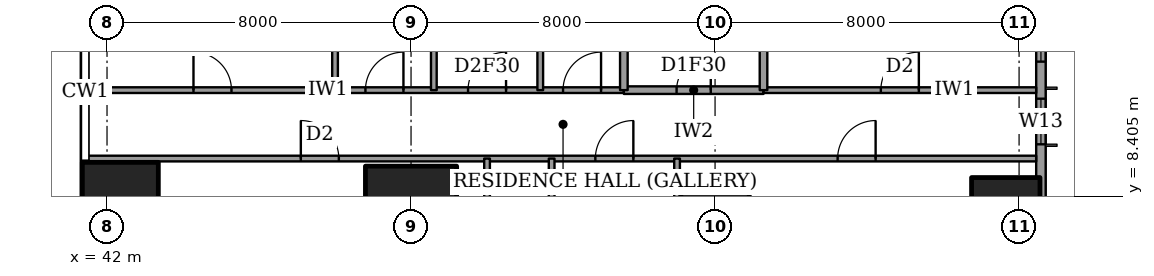
"""IFC4 building model, lengths in metres.
Left out: names, types, materials, properties, quantities, classifications, styles, units other than length and angle.
Written with IfcOpenShell. Run it as: python <this file> out.ifc"""

import sys

from ifc_helpers import new_model, si_unit, direction, frame, frame_2d, origin, origin_2d, place, context, subcontext, project, spatial, rectangle, extrude, element, fill, save


model = new_model("IFC4")
c1 = context("Model", 3, precision=1e-05, world=origin(), true_north=direction((0.0, 1.0)))
c2 = subcontext(c1, "Body", "Model", "MODEL_VIEW")
j1 = project(units=[si_unit("LENGTHUNIT", "METRE"), si_unit("PLANEANGLEUNIT", "RADIAN")], contexts=[c1])
p1 = place(None, origin())
s1 = spatial("IfcSite", under=j1, at=p1, CompositionType="ELEMENT")
p2 = place(p1, origin())
s2 = spatial("IfcBuilding", under=s1, at=p2, CompositionType="ELEMENT")
p3 = place(p2, frame((0.0, 0.0, 207.4)))
s3 = spatial("IfcBuildingStorey", under=s2, at=p3, CompositionType="ELEMENT", Elevation=207.4)
p4 = place(p3, frame((42.35, 8.0, 0.0), z_axis=(0.0, 0.0, 1.0), x_axis=(1.0, 0.0, 0.0)))
e1 = element("IfcColumn", 1, at=p4, inside=s3, PredefinedType="COLUMN", context=c2, shape_type="SweptSolid", body=[
    extrude(rectangle(XDim=2.0, YDim=2.6, at=origin_2d()), origin(), (0.0, 0.0, 1.0), 3.6),
])
p5 = place(p3, frame((50.0, 8.0, 0.0), z_axis=(0.0, 0.0, 1.0), x_axis=(1.0, 0.0, 0.0)))
e2 = element("IfcColumn", 2, at=p5, inside=s3, PredefinedType="COLUMN", context=c2, shape_type="SweptSolid", body=[
    extrude(rectangle(XDim=2.4, YDim=2.4, at=origin_2d()), origin(), (0.0, 0.0, 1.0), 3.6),
])
for number, where, z_axis, x_axis in (
    (3, (58.0, 8.0, 0.0), (0.0, 0.0, 1.0), (1.0, 0.0, 0.0)),
    (4, (65.65, 8.0, 0.0), (0.0, 0.0, 1.0), (1.0, 0.0, 0.0)),
):
    element("IfcColumn", number, at=place(p3, frame(where, z_axis=z_axis, x_axis=x_axis)), inside=s3, PredefinedType="COLUMN", context=c2, shape_type="SweptSolid", body=[
        extrude(rectangle(XDim=1.8, YDim=1.8, at=origin_2d()), origin(), (0.0, 0.0, 1.0), 3.6),
    ])
p6 = place(p3, frame((66.575, 3.175, 0.0), z_axis=(0.0, 0.0, 1.0), x_axis=(0.0, 1.0, 0.0)))
e5 = element("IfcWall", 5, at=p6, inside=s3, PredefinedType="SOLIDWALL", context=c2, shape_type="SweptSolid", body=[
    extrude(rectangle(XDim=41.65, YDim=0.25, at=frame_2d((20.825, 0.0))), origin(), (0.0, 0.0, 1.0), 3.6),
])
p7 = place(p6, frame((0.825, 0.0, 0.2)))
e6 = element("IfcOpeningElement", 6, at=p7, cuts=e5, PredefinedType="OPENING", context=c2, shape_type="SweptSolid", body=[
    extrude(rectangle(XDim=2.4, YDim=2.4, at=frame_2d((1.2, 1.2))), frame((0.0, 0.135, 0.0), z_axis=(0.0, -1.0, 0.0), x_axis=(1.0, 0.0, 0.0)), (0.0, 0.0, 1.0), 0.27),
])
p8 = place(p6, frame((6.6, 0.0, 0.2)))
e7 = element("IfcOpeningElement", 7, at=p8, cuts=e5, PredefinedType="OPENING", context=c2, shape_type="SweptSolid", body=[
    extrude(rectangle(XDim=1.2, YDim=2.4, at=frame_2d((0.6, 1.2))), frame((0.0, 0.135, 0.0), z_axis=(0.0, -1.0, 0.0), x_axis=(1.0, 0.0, 0.0)), (0.0, 0.0, 1.0), 0.27),
])
p9 = place(p6, frame((8.775, 0.0, 0.2)))
e8 = element("IfcOpeningElement", 8, at=p9, cuts=e5, PredefinedType="OPENING", context=c2, shape_type="SweptSolid", body=[
    extrude(rectangle(XDim=2.4, YDim=2.4, at=frame_2d((1.2, 1.2))), frame((0.0, 0.135, 0.0), z_axis=(0.0, -1.0, 0.0), x_axis=(1.0, 0.0, 0.0)), (0.0, 0.0, 1.0), 0.27),
])
p10 = place(p6, frame((15.675, 0.0, 0.2)))
e9 = element("IfcOpeningElement", 9, at=p10, cuts=e5, PredefinedType="OPENING", context=c2, shape_type="SweptSolid", body=[
    extrude(rectangle(XDim=2.4, YDim=2.4, at=frame_2d((1.2, 1.2))), frame((0.0, 0.135, 0.0), z_axis=(0.0, -1.0, 0.0), x_axis=(1.0, 0.0, 0.0)), (0.0, 0.0, 1.0), 0.27),
])
p11 = place(p6, frame((23.575, 0.0, 0.2)))
e10 = element("IfcOpeningElement", 10, at=p11, cuts=e5, PredefinedType="OPENING", context=c2, shape_type="SweptSolid", body=[
    extrude(rectangle(XDim=2.4, YDim=2.4, at=frame_2d((1.2, 1.2))), frame((0.0, 0.135, 0.0), z_axis=(0.0, -1.0, 0.0), x_axis=(1.0, 0.0, 0.0)), (0.0, 0.0, 1.0), 0.27),
])
p12 = place(p6, frame((30.675, 0.0, 0.2)))
e11 = element("IfcOpeningElement", 11, at=p12, cuts=e5, PredefinedType="OPENING", context=c2, shape_type="SweptSolid", body=[
    extrude(rectangle(XDim=2.4, YDim=2.4, at=frame_2d((1.2, 1.2))), frame((0.0, 0.135, 0.0), z_axis=(0.0, -1.0, 0.0), x_axis=(1.0, 0.0, 0.0)), (0.0, 0.0, 1.0), 0.27),
])
p13 = place(p6, frame((34.325, 0.0, 0.2)))
e12 = element("IfcOpeningElement", 12, at=p13, cuts=e5, PredefinedType="OPENING", context=c2, shape_type="SweptSolid", body=[
    extrude(rectangle(XDim=1.2, YDim=2.4, at=frame_2d((0.6, 1.2))), frame((0.0, 0.135, 0.0), z_axis=(0.0, -1.0, 0.0), x_axis=(1.0, 0.0, 0.0)), (0.0, 0.0, 1.0), 0.27),
])
p14 = place(p6, frame((38.425, 0.0, 0.2)))
e13 = element("IfcOpeningElement", 13, at=p14, cuts=e5, PredefinedType="OPENING", context=c2, shape_type="SweptSolid", body=[
    extrude(rectangle(XDim=2.4, YDim=2.4, at=frame_2d((1.2, 1.2))), frame((0.0, 0.135, 0.0), z_axis=(0.0, -1.0, 0.0), x_axis=(1.0, 0.0, 0.0)), (0.0, 0.0, 1.0), 0.27),
])
p15 = place(p3, frame((41.439, 9.4, 0.0), z_axis=(0.0, 0.0, 1.0), x_axis=(1.0, 0.0, 0.0)))
e14 = element("IfcWall", 14, at=p15, inside=s3, PredefinedType="PARTITIONING", context=c2, shape_type="SweptSolid", body=[
    extrude(rectangle(XDim=25.011, YDim=0.15, at=frame_2d((12.505, 0.0))), origin(), (0.0, 0.0, 1.0), 3.35),
])
p16 = place(p15, frame((19.786, 0.0, 0.0)))
e15 = element("IfcOpeningElement", 15, at=p16, cuts=e14, PredefinedType="OPENING", context=c2, shape_type="SweptSolid", body=[
    extrude(rectangle(XDim=1.0, YDim=2.1, at=frame_2d((0.5, 1.05))), frame((0.0, 0.085, 0.0), z_axis=(0.0, -1.0, 0.0), x_axis=(1.0, 0.0, 0.0)), (0.0, 0.0, 1.0), 0.17),
])
p17 = place(p15, frame((13.411, 0.0, 0.0)))
e16 = element("IfcOpeningElement", 16, at=p17, cuts=e14, PredefinedType="OPENING", context=c2, shape_type="SweptSolid", body=[
    extrude(rectangle(XDim=1.0, YDim=2.1, at=frame_2d((0.5, 1.05))), frame((0.0, 0.085, 0.0), z_axis=(0.0, -1.0, 0.0), x_axis=(1.0, 0.0, 0.0)), (0.0, 0.0, 1.0), 0.17),
])
p18 = place(p15, frame((5.661, 0.0, 0.0)))
e17 = element("IfcOpeningElement", 17, at=p18, cuts=e14, PredefinedType="OPENING", context=c2, shape_type="SweptSolid", body=[
    extrude(rectangle(XDim=1.0, YDim=2.1, at=frame_2d((0.5, 1.05))), frame((0.0, 0.085, 0.0), z_axis=(0.0, -1.0, 0.0), x_axis=(1.0, 0.0, 0.0)), (0.0, 0.0, 1.0), 0.17),
])
p19 = place(p3, frame((55.6, 11.2, 0.0), z_axis=(0.0, 0.0, 1.0), x_axis=(1.0, 0.0, 0.0)))
e18 = element("IfcWall", 18, at=p19, inside=s3, PredefinedType="PARTITIONING", context=c2, shape_type="SweptSolid", body=[
    extrude(rectangle(XDim=3.675, YDim=0.2, at=frame_2d((1.837, 0.0))), origin(), (0.0, 0.0, 1.0), 3.35),
])
p20 = place(p19, frame((1.387, 0.0, 0.0)))
e19 = element("IfcOpeningElement", 19, at=p20, cuts=e18, PredefinedType="OPENING", context=c2, shape_type="SweptSolid", body=[
    extrude(rectangle(XDim=0.9, YDim=2.1, at=frame_2d((0.45, 1.05))), frame((0.0, 0.11, 0.0), z_axis=(0.0, -1.0, 0.0), x_axis=(1.0, 0.0, 0.0)), (0.0, 0.0, 1.0), 0.22),
])
p21 = place(p3, frame((41.439, 11.2, 0.0), z_axis=(0.0, 0.0, 1.0), x_axis=(1.0, 0.0, 0.0)))
e20 = element("IfcWall", 20, at=p21, inside=s3, PredefinedType="PARTITIONING", context=c2, shape_type="SweptSolid", body=[
    extrude(rectangle(XDim=14.161, YDim=0.15, at=frame_2d((7.081, 0.0))), origin(), (0.0, 0.0, 1.0), 3.35),
])
p22 = place(p21, frame((12.561, 0.0, 0.0)))
e21 = element("IfcOpeningElement", 21, at=p22, cuts=e20, PredefinedType="OPENING", context=c2, shape_type="SweptSolid", body=[
    extrude(rectangle(XDim=1.0, YDim=2.1, at=frame_2d((0.5, 1.05))), frame((0.0, 0.085, 0.0), z_axis=(0.0, -1.0, 0.0), x_axis=(1.0, 0.0, 0.0)), (0.0, 0.0, 1.0), 0.17),
])
p23 = place(p21, frame((10.061, 0.0, 0.0)))
e22 = element("IfcOpeningElement", 22, at=p23, cuts=e20, PredefinedType="OPENING", context=c2, shape_type="SweptSolid", body=[
    extrude(rectangle(XDim=1.0, YDim=2.1, at=frame_2d((0.5, 1.05))), frame((0.0, 0.085, 0.0), z_axis=(0.0, -1.0, 0.0), x_axis=(1.0, 0.0, 0.0)), (0.0, 0.0, 1.0), 0.17),
])
p24 = place(p21, frame((7.361, 0.0, 0.0)))
e23 = element("IfcOpeningElement", 23, at=p24, cuts=e20, PredefinedType="OPENING", context=c2, shape_type="SweptSolid", body=[
    extrude(rectangle(XDim=1.0, YDim=2.1, at=frame_2d((0.5, 1.05))), frame((0.0, 0.085, 0.0), z_axis=(0.0, -1.0, 0.0), x_axis=(1.0, 0.0, 0.0)), (0.0, 0.0, 1.0), 0.17),
])
p25 = place(p21, frame((2.836, 0.0, 0.0)))
e24 = element("IfcOpeningElement", 24, at=p25, cuts=e20, PredefinedType="OPENING", context=c2, shape_type="SweptSolid", body=[
    extrude(rectangle(XDim=1.0, YDim=2.1, at=frame_2d((0.5, 1.05))), frame((0.0, 0.085, 0.0), z_axis=(0.0, -1.0, 0.0), x_axis=(1.0, 0.0, 0.0)), (0.0, 0.0, 1.0), 0.17),
])
p26 = place(p3, frame((59.275, 11.2, 0.0), z_axis=(0.0, 0.0, 1.0), x_axis=(1.0, 0.0, 0.0)))
e25 = element("IfcWall", 25, at=p26, inside=s3, PredefinedType="PARTITIONING", context=c2, shape_type="SweptSolid", body=[
    extrude(rectangle(XDim=7.175, YDim=0.15, at=frame_2d((3.587, 0.0))), origin(), (0.0, 0.0, 1.0), 3.35),
])
p27 = place(p26, frame((3.087, 0.0, 0.0)))
e26 = element("IfcOpeningElement", 26, at=p27, cuts=e25, PredefinedType="OPENING", context=c2, shape_type="SweptSolid", body=[
    extrude(rectangle(XDim=1.0, YDim=2.1, at=frame_2d((0.5, 1.05))), frame((0.0, 0.085, 0.0), z_axis=(0.0, -1.0, 0.0), x_axis=(1.0, 0.0, 0.0)), (0.0, 0.0, 1.0), 0.17),
])
p28 = place(p3, frame((48.0, 11.2, 0.0), z_axis=(0.0, 0.0, 1.0), x_axis=(0.0, 1.0, 0.0)))
e27 = element("IfcWall", 27, at=p28, inside=s3, PredefinedType="PARTITIONING", context=c2, shape_type="SweptSolid", body=[
    extrude(rectangle(XDim=6.8, YDim=0.15, at=frame_2d((3.4, 0.0))), origin(), (0.0, 0.0, 1.0), 3.35),
])
p29 = place(p3, frame((50.6, 11.2, 0.0), z_axis=(0.0, 0.0, 1.0), x_axis=(0.0, 1.0, 0.0)))
e28 = element("IfcWall", 28, at=p29, inside=s3, PredefinedType="PARTITIONING", context=c2, shape_type="SweptSolid", body=[
    extrude(rectangle(XDim=3.6, YDim=0.15, at=frame_2d((1.8, 0.0))), origin(), (0.0, 0.0, 1.0), 3.35),
])
p30 = place(p3, frame((52.0, -0.45, 0.0), z_axis=(0.0, 0.0, 1.0), x_axis=(0.0, 1.0, 0.0)))
e29 = element("IfcWall", 29, at=p30, inside=s3, PredefinedType="PARTITIONING", context=c2, shape_type="SweptSolid", body=[
    extrude(rectangle(XDim=9.85, YDim=0.15, at=frame_2d((4.925, 0.0))), origin(), (0.0, 0.0, 1.0), 3.35),
])
p31 = place(p3, frame((53.4, 11.2, 0.0), z_axis=(0.0, 0.0, 1.0), x_axis=(0.0, 1.0, 0.0)))
e30 = element("IfcWall", 30, at=p31, inside=s3, PredefinedType="PARTITIONING", context=c2, shape_type="SweptSolid", body=[
    extrude(rectangle(XDim=6.8, YDim=0.15, at=frame_2d((3.4, 0.0))), origin(), (0.0, 0.0, 1.0), 3.35),
])
p32 = place(p3, frame((53.7, -0.45, 0.0), z_axis=(0.0, 0.0, 1.0), x_axis=(0.0, 1.0, 0.0)))
e31 = element("IfcWall", 31, at=p32, inside=s3, PredefinedType="PARTITIONING", context=c2, shape_type="SweptSolid", body=[
    extrude(rectangle(XDim=9.85, YDim=0.15, at=frame_2d((4.925, 0.0))), origin(), (0.0, 0.0, 1.0), 3.35),
])
p33 = place(p32, frame((4.475, 0.0, 0.0)))
e32 = element("IfcOpeningElement", 32, at=p33, cuts=e31, PredefinedType="OPENING", context=c2, shape_type="SweptSolid", body=[
    extrude(rectangle(XDim=0.9, YDim=2.1, at=frame_2d((0.45, 1.05))), frame((0.0, 0.085, 0.0), z_axis=(0.0, -1.0, 0.0), x_axis=(1.0, 0.0, 0.0)), (0.0, 0.0, 1.0), 0.17),
])
p34 = place(p3, frame((55.6, 11.2, 0.0), z_axis=(0.0, 0.0, 1.0), x_axis=(0.0, 1.0, 0.0)))
e33 = element("IfcWall", 33, at=p34, inside=s3, PredefinedType="PARTITIONING", context=c2, shape_type="SweptSolid", body=[
    extrude(rectangle(XDim=3.4, YDim=0.2, at=frame_2d((1.7, 0.0))), origin(), (0.0, 0.0, 1.0), 3.35),
])
p35 = place(p3, frame((57.0, -0.45, 0.0), z_axis=(0.0, 0.0, 1.0), x_axis=(0.0, 1.0, 0.0)))
e34 = element("IfcWall", 34, at=p35, inside=s3, PredefinedType="PARTITIONING", context=c2, shape_type="SweptSolid", body=[
    extrude(rectangle(XDim=9.85, YDim=0.15, at=frame_2d((4.925, 0.0))), origin(), (0.0, 0.0, 1.0), 3.35),
])
p36 = place(p3, frame((59.275, 11.2, 0.0), z_axis=(0.0, 0.0, 1.0), x_axis=(0.0, 1.0, 0.0)))
e35 = element("IfcWall", 35, at=p36, inside=s3, PredefinedType="PARTITIONING", context=c2, shape_type="SweptSolid", body=[
    extrude(rectangle(XDim=3.4, YDim=0.2, at=frame_2d((1.7, 0.0))), origin(), (0.0, 0.0, 1.0), 3.35),
])
p37 = place(p8, origin())
e36 = element("IfcWindow", 36, at=p37, inside=s3, PartitioningType="SINGLE_PANEL", PredefinedType="WINDOW", context=c2, shape_type="SweptSolid", body=[
    extrude(rectangle(XDim=1.2, YDim=2.4, at=frame_2d((0.6, 1.2))), frame((0.0, 0.03, 0.0), z_axis=(0.0, -1.0, 0.0), x_axis=(1.0, 0.0, 0.0)), (0.0, 0.0, 1.0), 0.06),
])
fill(e7, e36)
p38 = place(p9, origin())
e37 = element("IfcWindow", 37, at=p38, inside=s3, PartitioningType="SINGLE_PANEL", PredefinedType="WINDOW", context=c2, shape_type="SweptSolid", body=[
    extrude(rectangle(XDim=2.4, YDim=2.4, at=frame_2d((1.2, 1.2))), frame((0.0, 0.03, 0.0), z_axis=(0.0, -1.0, 0.0), x_axis=(1.0, 0.0, 0.0)), (0.0, 0.0, 1.0), 0.06),
])
fill(e8, e37)
p39 = place(p16, origin())
e38 = element("IfcDoor", 38, at=p39, inside=s3, OperationType="SINGLE_SWING_LEFT", PredefinedType="DOOR", context=c2, shape_type="SweptSolid", body=[
    extrude(rectangle(XDim=1.0, YDim=2.1, at=frame_2d((0.5, 1.05))), frame((0.0, 0.025, 0.0), z_axis=(0.0, -1.0, 0.0), x_axis=(1.0, 0.0, 0.0)), (0.0, 0.0, 1.0), 0.05),
])
fill(e15, e38)
p40 = place(p17, origin())
e39 = element("IfcDoor", 39, at=p40, inside=s3, OperationType="SINGLE_SWING_LEFT", PredefinedType="DOOR", context=c2, shape_type="SweptSolid", body=[
    extrude(rectangle(XDim=1.0, YDim=2.1, at=frame_2d((0.5, 1.05))), frame((0.0, 0.025, 0.0), z_axis=(0.0, -1.0, 0.0), x_axis=(1.0, 0.0, 0.0)), (0.0, 0.0, 1.0), 0.05),
])
fill(e16, e39)
p41 = place(p18, origin())
e40 = element("IfcDoor", 40, at=p41, inside=s3, OperationType="SINGLE_SWING_RIGHT", PredefinedType="DOOR", context=c2, shape_type="SweptSolid", body=[
    extrude(rectangle(XDim=1.0, YDim=2.1, at=frame_2d((0.5, 1.05))), frame((0.0, 0.025, 0.0), z_axis=(0.0, -1.0, 0.0), x_axis=(1.0, 0.0, 0.0)), (0.0, 0.0, 1.0), 0.05),
])
fill(e17, e40)
p42 = place(p22, origin())
e41 = element("IfcDoor", 41, at=p42, inside=s3, OperationType="SINGLE_SWING_LEFT", PredefinedType="DOOR", context=c2, shape_type="SweptSolid", body=[
    extrude(rectangle(XDim=1.0, YDim=2.1, at=frame_2d((0.5, 1.05))), frame((0.0, 0.025, 0.0), z_axis=(0.0, -1.0, 0.0), x_axis=(1.0, 0.0, 0.0)), (0.0, 0.0, 1.0), 0.05),
])
fill(e21, e41)
p43 = place(p27, origin())
e42 = element("IfcDoor", 42, at=p43, inside=s3, OperationType="SINGLE_SWING_LEFT", PredefinedType="DOOR", context=c2, shape_type="SweptSolid", body=[
    extrude(rectangle(XDim=1.0, YDim=2.1, at=frame_2d((0.5, 1.05))), frame((0.0, 0.025, 0.0), z_axis=(0.0, -1.0, 0.0), x_axis=(1.0, 0.0, 0.0)), (0.0, 0.0, 1.0), 0.05),
])
fill(e26, e42)
p44 = place(p20, origin())
e43 = element("IfcDoor", 43, at=p44, inside=s3, OperationType="SINGLE_SWING_LEFT", PredefinedType="DOOR", context=c2, shape_type="SweptSolid", body=[
    extrude(rectangle(XDim=0.9, YDim=2.1, at=frame_2d((0.45, 1.05))), frame((0.0, 0.025, 0.0), z_axis=(0.0, -1.0, 0.0), x_axis=(1.0, 0.0, 0.0)), (0.0, 0.0, 1.0), 0.05),
])
fill(e19, e43)
p45 = place(p23, origin())
e44 = element("IfcDoor", 44, at=p45, inside=s3, OperationType="SINGLE_SWING_LEFT", PredefinedType="DOOR", context=c2, shape_type="SweptSolid", body=[
    extrude(rectangle(XDim=1.0, YDim=2.1, at=frame_2d((0.5, 1.05))), frame((0.0, 0.025, 0.0), z_axis=(0.0, -1.0, 0.0), x_axis=(1.0, 0.0, 0.0)), (0.0, 0.0, 1.0), 0.05),
])
fill(e22, e44)
p46 = place(p24, origin())
e45 = element("IfcDoor", 45, at=p46, inside=s3, OperationType="SINGLE_SWING_LEFT", PredefinedType="DOOR", context=c2, shape_type="SweptSolid", body=[
    extrude(rectangle(XDim=1.0, YDim=2.1, at=frame_2d((0.5, 1.05))), frame((0.0, 0.025, 0.0), z_axis=(0.0, -1.0, 0.0), x_axis=(1.0, 0.0, 0.0)), (0.0, 0.0, 1.0), 0.05),
])
fill(e23, e45)
p47 = place(p25, origin())
e46 = element("IfcDoor", 46, at=p47, inside=s3, OperationType="SINGLE_SWING_RIGHT", PredefinedType="DOOR", context=c2, shape_type="SweptSolid", body=[
    extrude(rectangle(XDim=1.0, YDim=2.1, at=frame_2d((0.5, 1.05))), frame((0.0, 0.025, 0.0), z_axis=(0.0, -1.0, 0.0), x_axis=(1.0, 0.0, 0.0)), (0.0, 0.0, 1.0), 0.05),
])
fill(e24, e46)
save(model, sys.argv[1])
